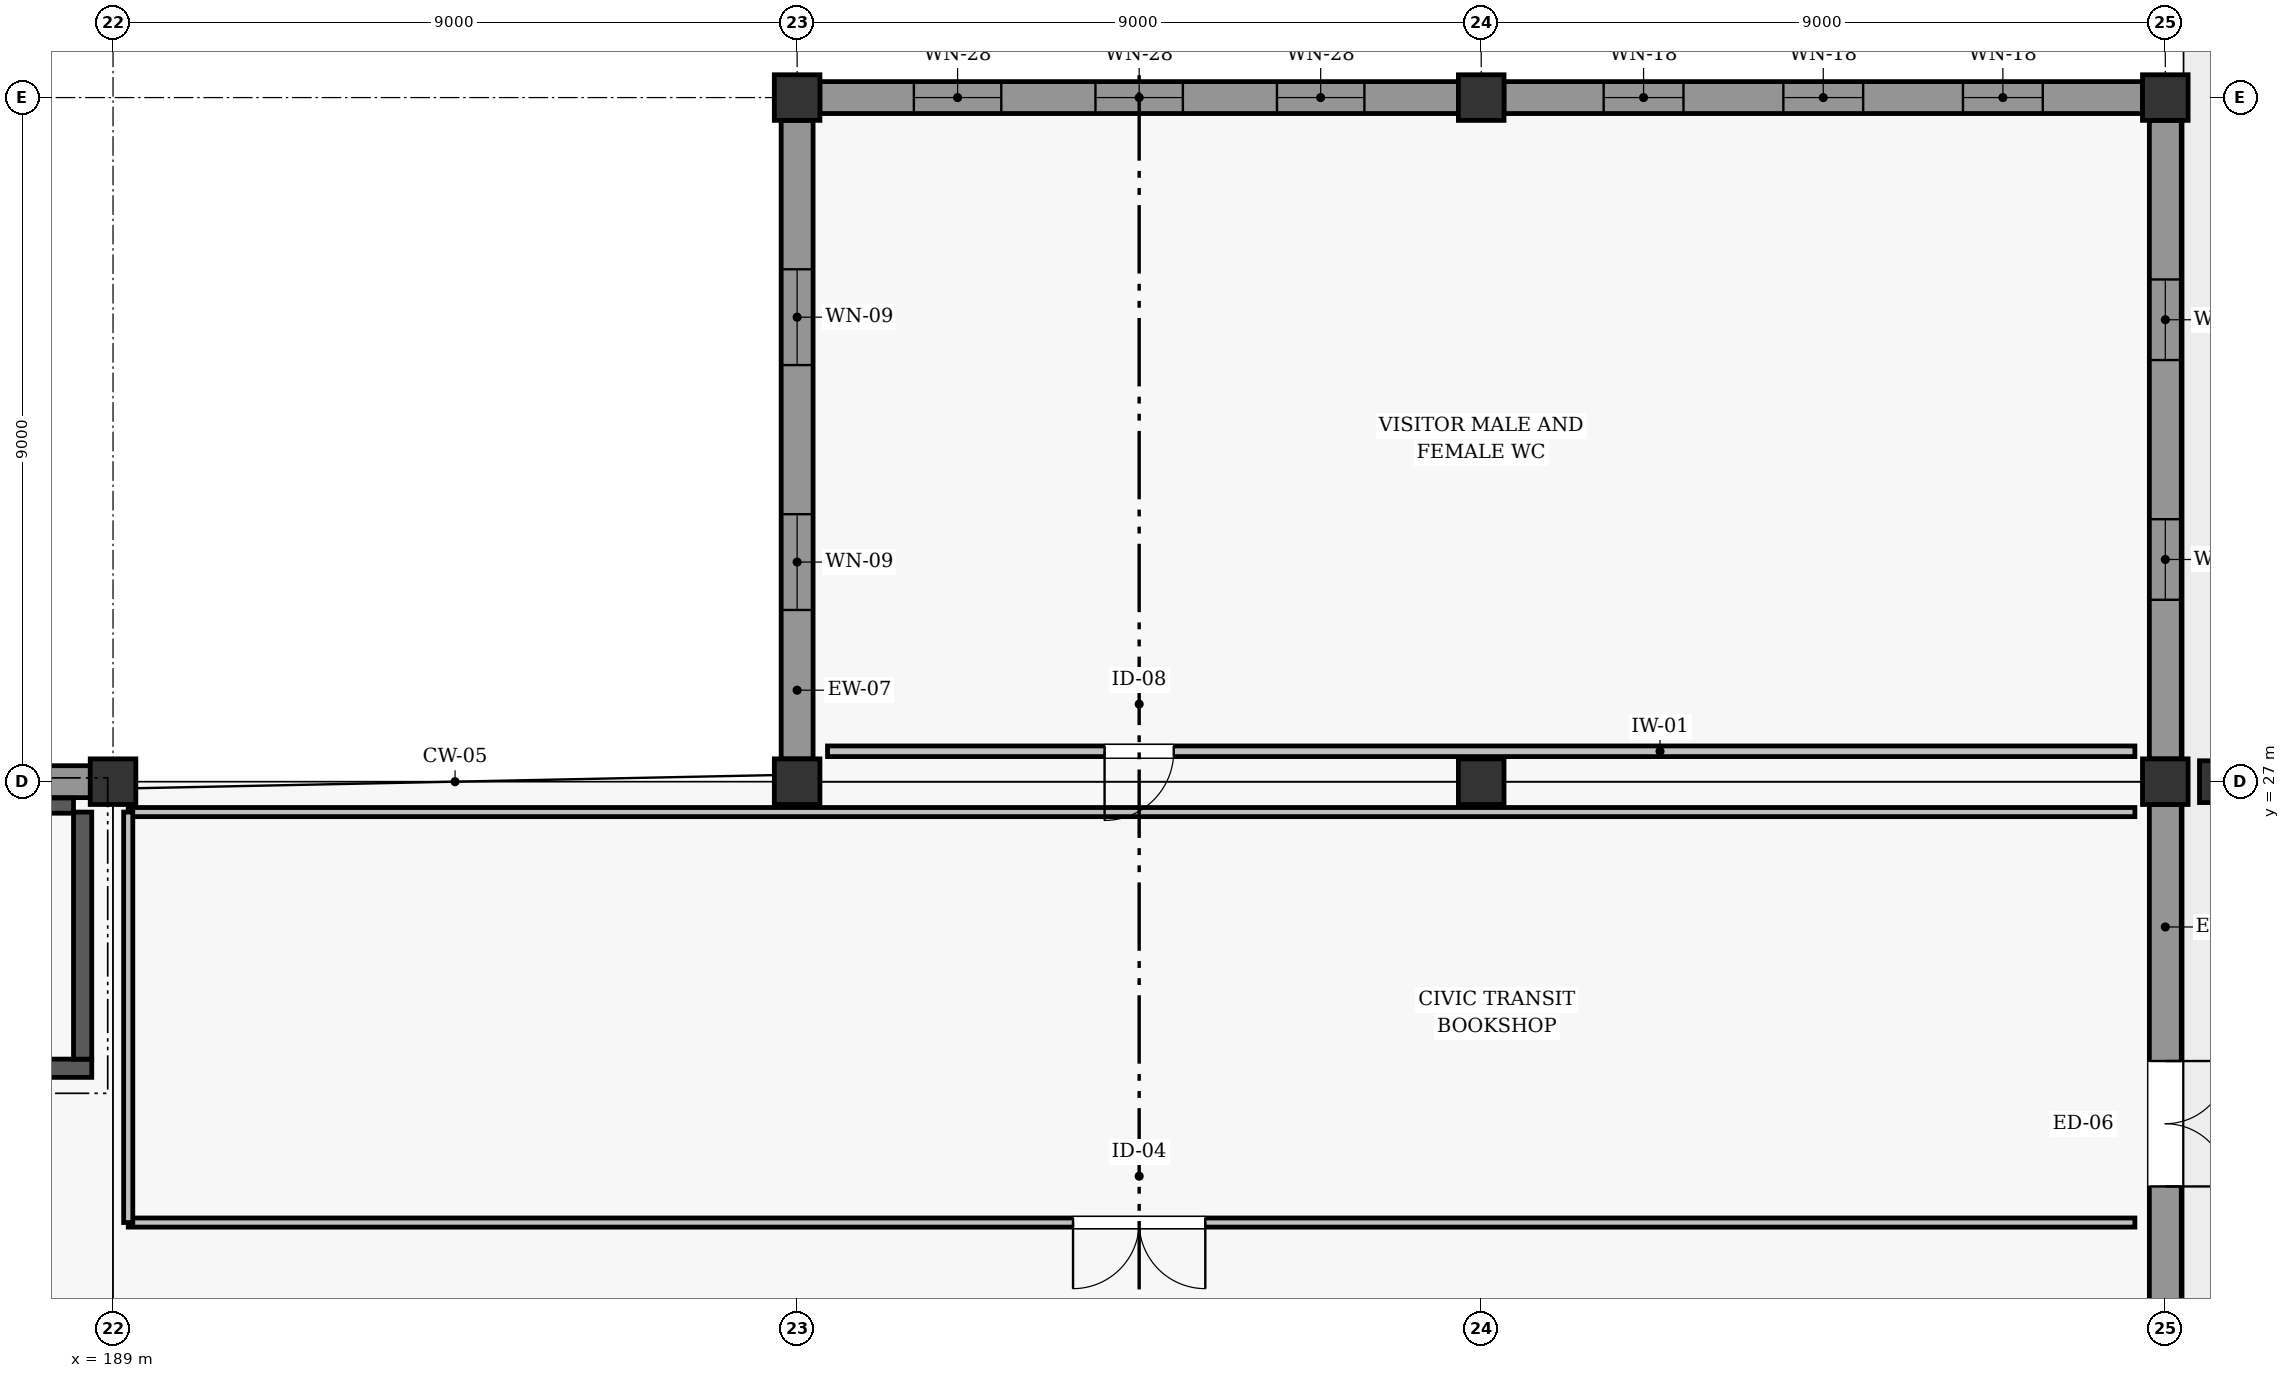
"""IFC4 building model, lengths in metres.
Left out: names, types, materials, properties, quantities, classifications, styles, units other than length and angle.
Written with IfcOpenShell. Run it as: python <this file> out.ifc"""

import sys

from ifc_helpers import new_model, si_unit, direction, frame, frame_2d, origin, origin_2d, place, context, subcontext, project, spatial, rectangle, extrude, element, fill, save


model = new_model("IFC4")
c1 = context("Model", 3, precision=1e-05, world=origin(), true_north=direction((0.0, 1.0)))
c2 = subcontext(c1, "Body", "Model", "MODEL_VIEW")
j1 = project(units=[si_unit("LENGTHUNIT", "METRE"), si_unit("PLANEANGLEUNIT", "RADIAN")], contexts=[c1])
p1 = place(None, origin())
s1 = spatial("IfcSite", under=j1, at=p1, CompositionType="ELEMENT")
p2 = place(p1, origin())
s2 = spatial("IfcBuilding", under=s1, at=p2, CompositionType="ELEMENT")
p3 = place(p2, origin())
s3 = spatial("IfcBuildingStorey", under=s2, at=p3, CompositionType="ELEMENT", Elevation=0.0)
for number, where, z_axis, x_axis in (
    (1, (189.0, 27.0, 0.0), (0.0, 0.0, 1.0), (1.0, 0.0, 0.0)),
    (2, (198.0, 27.0, 0.0), (0.0, 0.0, 1.0), (1.0, 0.0, 0.0)),
    (3, (198.0, 36.0, 0.0), (0.0, 0.0, 1.0), (1.0, 0.0, 0.0)),
    (4, (207.0, 27.0, 0.0), (0.0, 0.0, 1.0), (1.0, 0.0, 0.0)),
    (5, (207.0, 36.0, 0.0), (0.0, 0.0, 1.0), (1.0, 0.0, 0.0)),
    (6, (216.0, 27.0, 0.0), (0.0, 0.0, 1.0), (1.0, 0.0, 0.0)),
    (7, (216.0, 36.0, 0.0), (0.0, 0.0, 1.0), (1.0, 0.0, 0.0)),
):
    element("IfcColumn", number, at=place(p3, frame(where, z_axis=z_axis, x_axis=x_axis)), inside=s3, PredefinedType="COLUMN", context=c2, shape_type="SweptSolid", body=[
        extrude(rectangle(XDim=0.6, YDim=0.6, at=origin_2d()), origin(), (0.0, 0.0, 1.0), 4.8),
    ])
p4 = place(p3, frame((216.85, 27.0, 0.0), z_axis=(0.0, 0.0, 1.0), x_axis=(0.0, 1.0, 0.0)))
e8 = element("IfcColumn", 8, at=p4, inside=s3, PredefinedType="PILASTER", context=c2, shape_type="SweptSolid", body=[
    extrude(rectangle(XDim=0.55, YDim=0.8, at=origin_2d()), origin(), (0.0, 0.0, 1.0), 4.8),
])
p5 = place(p3, frame((180.298, 27.0, 0.0), z_axis=(0.0, 0.0, 1.0), x_axis=(1.0, 0.0, 0.0)))
e9 = element("IfcWall", 9, at=p5, inside=s3, PredefinedType="SOLIDWALL", context=c2, shape_type="SweptSolid", body=[
    extrude(rectangle(XDim=8.404, YDim=0.42, at=frame_2d((4.202, 0.0))), origin(), (0.0, 0.0, 1.0), 3.902),
])
p6 = place(p5, frame((0.442, 0.0, 0.0)))
e10 = element("IfcOpeningElement", 10, at=p6, cuts=e9, PredefinedType="OPENING", context=c2, shape_type="SweptSolid", body=[
    extrude(rectangle(XDim=1.12, YDim=2.14, at=frame_2d((0.56, 1.07))), frame((0.0, 0.22, 0.0), z_axis=(0.0, -1.0, 0.0), x_axis=(1.0, 0.0, 0.0)), (0.0, 0.0, 1.0), 0.44),
])
p7 = place(p3, frame((198.298, 36.0, 0.0), z_axis=(0.0, 0.0, 1.0), x_axis=(1.0, 0.0, 0.0)))
e11 = element("IfcWall", 11, at=p7, inside=s3, PredefinedType="SOLIDWALL", context=c2, shape_type="SweptSolid", body=[
    extrude(rectangle(XDim=8.404, YDim=0.42, at=frame_2d((4.202, 0.0))), origin(), (0.0, 0.0, 1.0), 4.002),
])
p8 = place(p7, frame((1.238, 0.0, 0.85)))
e12 = element("IfcOpeningElement", 12, at=p8, cuts=e11, PredefinedType="OPENING", context=c2, shape_type="SweptSolid", body=[
    extrude(rectangle(XDim=1.15, YDim=1.96, at=frame_2d((0.575, 0.98))), frame((0.0, 0.22, 0.0), z_axis=(0.0, -1.0, 0.0), x_axis=(1.0, 0.0, 0.0)), (0.0, 0.0, 1.0), 0.44),
])
p9 = place(p7, frame((3.627, 0.0, 0.85)))
e13 = element("IfcOpeningElement", 13, at=p9, cuts=e11, PredefinedType="OPENING", context=c2, shape_type="SweptSolid", body=[
    extrude(rectangle(XDim=1.15, YDim=1.96, at=frame_2d((0.575, 0.98))), frame((0.0, 0.22, 0.0), z_axis=(0.0, -1.0, 0.0), x_axis=(1.0, 0.0, 0.0)), (0.0, 0.0, 1.0), 0.44),
])
p10 = place(p7, frame((6.015, 0.0, 0.85)))
e14 = element("IfcOpeningElement", 14, at=p10, cuts=e11, PredefinedType="OPENING", context=c2, shape_type="SweptSolid", body=[
    extrude(rectangle(XDim=1.15, YDim=1.96, at=frame_2d((0.575, 0.98))), frame((0.0, 0.22, 0.0), z_axis=(0.0, -1.0, 0.0), x_axis=(1.0, 0.0, 0.0)), (0.0, 0.0, 1.0), 0.44),
])
p11 = place(p3, frame((207.298, 36.0, 0.0), z_axis=(0.0, 0.0, 1.0), x_axis=(1.0, 0.0, 0.0)))
e15 = element("IfcWall", 15, at=p11, inside=s3, PredefinedType="SOLIDWALL", context=c2, shape_type="SweptSolid", body=[
    extrude(rectangle(XDim=8.404, YDim=0.42, at=frame_2d((4.202, 0.0))), origin(), (0.0, 0.0, 1.0), 4.002),
])
p12 = place(p11, frame((1.313, 0.0, 0.85)))
e16 = element("IfcOpeningElement", 16, at=p12, cuts=e15, PredefinedType="OPENING", context=c2, shape_type="SweptSolid", body=[
    extrude(rectangle(XDim=1.05, YDim=1.88, at=frame_2d((0.525, 0.94))), frame((0.0, 0.22, 0.0), z_axis=(0.0, -1.0, 0.0), x_axis=(1.0, 0.0, 0.0)), (0.0, 0.0, 1.0), 0.44),
])
p13 = place(p11, frame((3.677, 0.0, 0.85)))
e17 = element("IfcOpeningElement", 17, at=p13, cuts=e15, PredefinedType="OPENING", context=c2, shape_type="SweptSolid", body=[
    extrude(rectangle(XDim=1.05, YDim=1.88, at=frame_2d((0.525, 0.94))), frame((0.0, 0.22, 0.0), z_axis=(0.0, -1.0, 0.0), x_axis=(1.0, 0.0, 0.0)), (0.0, 0.0, 1.0), 0.44),
])
p14 = place(p11, frame((6.04, 0.0, 0.85)))
e18 = element("IfcOpeningElement", 18, at=p14, cuts=e15, PredefinedType="OPENING", context=c2, shape_type="SweptSolid", body=[
    extrude(rectangle(XDim=1.05, YDim=1.88, at=frame_2d((0.525, 0.94))), frame((0.0, 0.22, 0.0), z_axis=(0.0, -1.0, 0.0), x_axis=(1.0, 0.0, 0.0)), (0.0, 0.0, 1.0), 0.44),
])
p15 = place(p3, frame((198.0, 27.298, 0.0), z_axis=(0.0, 0.0, 1.0), x_axis=(0.0, 1.0, 0.0)))
e19 = element("IfcWall", 19, at=p15, inside=s3, PredefinedType="SOLIDWALL", context=c2, shape_type="SweptSolid", body=[
    extrude(rectangle(XDim=8.404, YDim=0.42, at=frame_2d((4.202, 0.0))), origin(), (0.0, 0.0, 1.0), 4.102),
])
p16 = place(p15, frame((1.961, 0.0, 0.85)))
e20 = element("IfcOpeningElement", 20, at=p16, cuts=e19, PredefinedType="OPENING", context=c2, shape_type="SweptSolid", body=[
    extrude(rectangle(XDim=1.26, YDim=1.46, at=frame_2d((0.63, 0.73))), frame((0.0, 0.22, 0.0), z_axis=(0.0, -1.0, 0.0), x_axis=(1.0, 0.0, 0.0)), (0.0, 0.0, 1.0), 0.44),
])
p17 = place(p15, frame((5.183, 0.0, 0.85)))
e21 = element("IfcOpeningElement", 21, at=p17, cuts=e19, PredefinedType="OPENING", context=c2, shape_type="SweptSolid", body=[
    extrude(rectangle(XDim=1.26, YDim=1.46, at=frame_2d((0.63, 0.73))), frame((0.0, 0.22, 0.0), z_axis=(0.0, -1.0, 0.0), x_axis=(1.0, 0.0, 0.0)), (0.0, 0.0, 1.0), 0.44),
])
p18 = place(p3, frame((216.0, 18.298, 0.0), z_axis=(0.0, 0.0, 1.0), x_axis=(0.0, 1.0, 0.0)))
e22 = element("IfcWall", 22, at=p18, inside=s3, PredefinedType="SOLIDWALL", context=c2, shape_type="SweptSolid", body=[
    extrude(rectangle(XDim=8.404, YDim=0.42, at=frame_2d((4.202, 0.0))), origin(), (0.0, 0.0, 1.0), 4.062),
])
p19 = place(p18, frame((3.377, 0.0, 0.0)))
e23 = element("IfcOpeningElement", 23, at=p19, cuts=e22, PredefinedType="OPENING", context=c2, shape_type="SweptSolid", body=[
    extrude(rectangle(XDim=1.65, YDim=2.28, at=frame_2d((0.825, 1.14))), frame((0.0, 0.22, 0.0), z_axis=(0.0, -1.0, 0.0), x_axis=(1.0, 0.0, 0.0)), (0.0, 0.0, 1.0), 0.44),
])
p20 = place(p3, frame((216.0, 27.298, 0.0), z_axis=(0.0, 0.0, 1.0), x_axis=(0.0, 1.0, 0.0)))
e24 = element("IfcWall", 24, at=p20, inside=s3, PredefinedType="SOLIDWALL", context=c2, shape_type="SweptSolid", body=[
    extrude(rectangle(XDim=8.404, YDim=0.42, at=frame_2d((4.202, 0.0))), origin(), (0.0, 0.0, 1.0), 4.102),
])
p21 = place(p20, frame((2.095, 0.0, 0.85)))
e25 = element("IfcOpeningElement", 25, at=p21, cuts=e24, PredefinedType="OPENING", context=c2, shape_type="SweptSolid", body=[
    extrude(rectangle(XDim=1.06, YDim=1.35, at=frame_2d((0.53, 0.675))), frame((0.0, 0.22, 0.0), z_axis=(0.0, -1.0, 0.0), x_axis=(1.0, 0.0, 0.0)), (0.0, 0.0, 1.0), 0.44),
])
p22 = place(p20, frame((5.249, 0.0, 0.85)))
e26 = element("IfcOpeningElement", 26, at=p22, cuts=e24, PredefinedType="OPENING", context=c2, shape_type="SweptSolid", body=[
    extrude(rectangle(XDim=1.06, YDim=1.35, at=frame_2d((0.53, 0.675))), frame((0.0, 0.22, 0.0), z_axis=(0.0, -1.0, 0.0), x_axis=(1.0, 0.0, 0.0)), (0.0, 0.0, 1.0), 0.44),
])
p23 = place(p3, frame((180.28, 23.23, 0.0), z_axis=(0.0, 0.0, 1.0), x_axis=(1.0, 0.0, 0.0)))
e27 = element("IfcWall", 27, at=p23, inside=s3, PredefinedType="SHEAR", context=c2, shape_type="SweptSolid", body=[
    extrude(rectangle(XDim=8.44, YDim=0.24, at=frame_2d((4.22, 0.0))), origin(), (0.0, 0.0, 1.0), 4.55),
])
p24 = place(p23, frame((0.48, 0.0, 0.0)))
e28 = element("IfcOpeningElement", 28, at=p24, cuts=e27, PredefinedType="OPENING", context=c2, shape_type="SweptSolid", body=[
    extrude(rectangle(XDim=1.08, YDim=2.08, at=frame_2d((0.54, 1.04))), frame((0.0, 0.13, 0.0), z_axis=(0.0, -1.0, 0.0), x_axis=(1.0, 0.0, 0.0)), (0.0, 0.0, 1.0), 0.26),
])
p25 = place(p3, frame((182.07, 26.685, 0.0), z_axis=(0.0, 0.0, 1.0), x_axis=(1.0, 0.0, 0.0)))
e29 = element("IfcWall", 29, at=p25, inside=s3, PredefinedType="SHEAR", context=c2, shape_type="SweptSolid", body=[
    extrude(rectangle(XDim=6.41, YDim=0.2, at=frame_2d((3.205, 0.0))), origin(), (0.0, 0.0, 1.0), 4.55),
])
p26 = place(p3, frame((188.6, 23.35, 0.0), z_axis=(0.0, 0.0, 1.0), x_axis=(0.0, 1.0, 0.0)))
e30 = element("IfcWall", 30, at=p26, inside=s3, PredefinedType="SHEAR", context=c2, shape_type="SweptSolid", body=[
    extrude(rectangle(XDim=3.25, YDim=0.24, at=frame_2d((1.625, 0.0))), origin(), (0.0, 0.0, 1.0), 4.55),
])
p27 = place(p3, frame((189.2, 21.2, 0.0), z_axis=(0.0, 0.0, 1.0), x_axis=(1.0, 0.0, 0.0)))
e31 = element("IfcWall", 31, at=p27, inside=s3, PredefinedType="PARTITIONING", context=c2, shape_type="SweptSolid", body=[
    extrude(rectangle(XDim=26.4, YDim=0.12, at=frame_2d((13.2, 0.0))), origin(), (0.0, 0.0, 1.0), 3.885),
])
p28 = place(p27, frame((12.43, 0.0, 0.0)))
e32 = element("IfcOpeningElement", 32, at=p28, cuts=e31, PredefinedType="OPENING", context=c2, shape_type="SweptSolid", body=[
    extrude(rectangle(XDim=1.74, YDim=2.18, at=frame_2d((0.87, 1.09))), frame((0.0, 0.07, 0.0), z_axis=(0.0, -1.0, 0.0), x_axis=(1.0, 0.0, 0.0)), (0.0, 0.0, 1.0), 0.14),
])
p29 = place(p3, frame((189.2, 26.6, 0.0), z_axis=(0.0, 0.0, 1.0), x_axis=(1.0, 0.0, 0.0)))
e33 = element("IfcWall", 33, at=p29, inside=s3, PredefinedType="PARTITIONING", context=c2, shape_type="SweptSolid", body=[
    extrude(rectangle(XDim=26.4, YDim=0.12, at=frame_2d((13.2, 0.0))), origin(), (0.0, 0.0, 1.0), 3.885),
])
p30 = place(p3, frame((189.2, 21.2, 0.0), z_axis=(0.0, 0.0, 1.0), x_axis=(0.0, 1.0, 0.0)))
e34 = element("IfcWall", 34, at=p30, inside=s3, PredefinedType="PARTITIONING", context=c2, shape_type="SweptSolid", body=[
    extrude(rectangle(XDim=5.4, YDim=0.12, at=frame_2d((2.7, 0.0))), origin(), (0.0, 0.0, 1.0), 3.885),
])
p31 = place(p3, frame((198.4, 27.4, 0.0), z_axis=(0.0, 0.0, 1.0), x_axis=(1.0, 0.0, 0.0)))
e35 = element("IfcWall", 35, at=p31, inside=s3, PredefinedType="PARTITIONING", context=c2, shape_type="SweptSolid", body=[
    extrude(rectangle(XDim=17.2, YDim=0.14, at=frame_2d((8.6, 0.0))), origin(), (0.0, 0.0, 1.0), 3.925),
])
p32 = place(p31, frame((3.645, 0.0, 0.0)))
e36 = element("IfcOpeningElement", 36, at=p32, cuts=e35, PredefinedType="OPENING", context=c2, shape_type="SweptSolid", body=[
    extrude(rectangle(XDim=0.91, YDim=2.04, at=frame_2d((0.455, 1.02))), frame((0.0, 0.08, 0.0), z_axis=(0.0, -1.0, 0.0), x_axis=(1.0, 0.0, 0.0)), (0.0, 0.0, 1.0), 0.16),
])
p33 = place(p8, origin())
e37 = element("IfcWindow", 37, at=p33, inside=s3, PartitioningType="SINGLE_PANEL", PredefinedType="WINDOW", context=c2, shape_type="SweptSolid", body=[
    extrude(rectangle(XDim=1.15, YDim=1.96, at=frame_2d((0.575, 0.98))), frame((0.0, 0.03, 0.0), z_axis=(0.0, -1.0, 0.0), x_axis=(1.0, 0.0, 0.0)), (0.0, 0.0, 1.0), 0.06),
])
fill(e12, e37)
p34 = place(p9, origin())
e38 = element("IfcWindow", 38, at=p34, inside=s3, PartitioningType="SINGLE_PANEL", PredefinedType="WINDOW", context=c2, shape_type="SweptSolid", body=[
    extrude(rectangle(XDim=1.15, YDim=1.96, at=frame_2d((0.575, 0.98))), frame((0.0, 0.03, 0.0), z_axis=(0.0, -1.0, 0.0), x_axis=(1.0, 0.0, 0.0)), (0.0, 0.0, 1.0), 0.06),
])
fill(e13, e38)
p35 = place(p10, origin())
e39 = element("IfcWindow", 39, at=p35, inside=s3, PartitioningType="SINGLE_PANEL", PredefinedType="WINDOW", context=c2, shape_type="SweptSolid", body=[
    extrude(rectangle(XDim=1.15, YDim=1.96, at=frame_2d((0.575, 0.98))), frame((0.0, 0.03, 0.0), z_axis=(0.0, -1.0, 0.0), x_axis=(1.0, 0.0, 0.0)), (0.0, 0.0, 1.0), 0.06),
])
fill(e14, e39)
p36 = place(p12, origin())
e40 = element("IfcWindow", 40, at=p36, inside=s3, PartitioningType="SINGLE_PANEL", PredefinedType="WINDOW", context=c2, shape_type="SweptSolid", body=[
    extrude(rectangle(XDim=1.05, YDim=1.88, at=frame_2d((0.525, 0.94))), frame((0.0, 0.03, 0.0), z_axis=(0.0, -1.0, 0.0), x_axis=(1.0, 0.0, 0.0)), (0.0, 0.0, 1.0), 0.06),
])
fill(e16, e40)
p37 = place(p13, origin())
e41 = element("IfcWindow", 41, at=p37, inside=s3, PartitioningType="SINGLE_PANEL", PredefinedType="WINDOW", context=c2, shape_type="SweptSolid", body=[
    extrude(rectangle(XDim=1.05, YDim=1.88, at=frame_2d((0.525, 0.94))), frame((0.0, 0.03, 0.0), z_axis=(0.0, -1.0, 0.0), x_axis=(1.0, 0.0, 0.0)), (0.0, 0.0, 1.0), 0.06),
])
fill(e17, e41)
p38 = place(p14, origin())
e42 = element("IfcWindow", 42, at=p38, inside=s3, PartitioningType="SINGLE_PANEL", PredefinedType="WINDOW", context=c2, shape_type="SweptSolid", body=[
    extrude(rectangle(XDim=1.05, YDim=1.88, at=frame_2d((0.525, 0.94))), frame((0.0, 0.03, 0.0), z_axis=(0.0, -1.0, 0.0), x_axis=(1.0, 0.0, 0.0)), (0.0, 0.0, 1.0), 0.06),
])
fill(e18, e42)
p39 = place(p16, origin())
e43 = element("IfcWindow", 43, at=p39, inside=s3, PartitioningType="SINGLE_PANEL", PredefinedType="WINDOW", context=c2, shape_type="SweptSolid", body=[
    extrude(rectangle(XDim=1.26, YDim=1.46, at=frame_2d((0.63, 0.73))), frame((0.0, 0.03, 0.0), z_axis=(0.0, -1.0, 0.0), x_axis=(1.0, 0.0, 0.0)), (0.0, 0.0, 1.0), 0.06),
])
fill(e20, e43)
p40 = place(p17, origin())
e44 = element("IfcWindow", 44, at=p40, inside=s3, PartitioningType="SINGLE_PANEL", PredefinedType="WINDOW", context=c2, shape_type="SweptSolid", body=[
    extrude(rectangle(XDim=1.26, YDim=1.46, at=frame_2d((0.63, 0.73))), frame((0.0, 0.03, 0.0), z_axis=(0.0, -1.0, 0.0), x_axis=(1.0, 0.0, 0.0)), (0.0, 0.0, 1.0), 0.06),
])
fill(e21, e44)
p41 = place(p19, frame((1.65, 0.0, 0.0), z_axis=(0.0, 0.0, 1.0), x_axis=(-1.0, 0.0, 0.0)))
e45 = element("IfcDoor", 45, at=p41, inside=s3, OperationType="DOUBLE_SWING_LEFT", PredefinedType="DOOR", context=c2, shape_type="SweptSolid", body=[
    extrude(rectangle(XDim=1.65, YDim=2.28, at=frame_2d((0.825, 1.14))), frame((0.0, 0.025, 0.0), z_axis=(0.0, -1.0, 0.0), x_axis=(1.0, 0.0, 0.0)), (0.0, 0.0, 1.0), 0.05),
])
fill(e23, e45)
p42 = place(p21, origin())
e46 = element("IfcWindow", 46, at=p42, inside=s3, PartitioningType="SINGLE_PANEL", PredefinedType="WINDOW", context=c2, shape_type="SweptSolid", body=[
    extrude(rectangle(XDim=1.06, YDim=1.35, at=frame_2d((0.53, 0.675))), frame((0.0, 0.03, 0.0), z_axis=(0.0, -1.0, 0.0), x_axis=(1.0, 0.0, 0.0)), (0.0, 0.0, 1.0), 0.06),
])
fill(e25, e46)
p43 = place(p22, origin())
e47 = element("IfcWindow", 47, at=p43, inside=s3, PartitioningType="SINGLE_PANEL", PredefinedType="WINDOW", context=c2, shape_type="SweptSolid", body=[
    extrude(rectangle(XDim=1.06, YDim=1.35, at=frame_2d((0.53, 0.675))), frame((0.0, 0.03, 0.0), z_axis=(0.0, -1.0, 0.0), x_axis=(1.0, 0.0, 0.0)), (0.0, 0.0, 1.0), 0.06),
])
fill(e26, e47)
p44 = place(p28, frame((1.74, 0.0, 0.0), z_axis=(0.0, 0.0, 1.0), x_axis=(-1.0, 0.0, 0.0)))
e48 = element("IfcDoor", 48, at=p44, inside=s3, OperationType="DOUBLE_SWING_LEFT", PredefinedType="DOOR", context=c2, shape_type="SweptSolid", body=[
    extrude(rectangle(XDim=1.74, YDim=2.18, at=frame_2d((0.87, 1.09))), frame((0.0, 0.025, 0.0), z_axis=(0.0, -1.0, 0.0), x_axis=(1.0, 0.0, 0.0)), (0.0, 0.0, 1.0), 0.05),
])
fill(e32, e48)
p45 = place(p32, frame((0.91, 0.0, 0.0), z_axis=(0.0, 0.0, 1.0), x_axis=(-1.0, 0.0, 0.0)))
e49 = element("IfcDoor", 49, at=p45, inside=s3, OperationType="SINGLE_SWING_LEFT", PredefinedType="DOOR", context=c2, shape_type="SweptSolid", body=[
    extrude(rectangle(XDim=0.91, YDim=2.04, at=frame_2d((0.455, 1.02))), frame((0.0, 0.025, 0.0), z_axis=(0.0, -1.0, 0.0), x_axis=(1.0, 0.0, 0.0)), (0.0, 0.0, 1.0), 0.05),
])
fill(e36, e49)
save(model, sys.argv[1])
